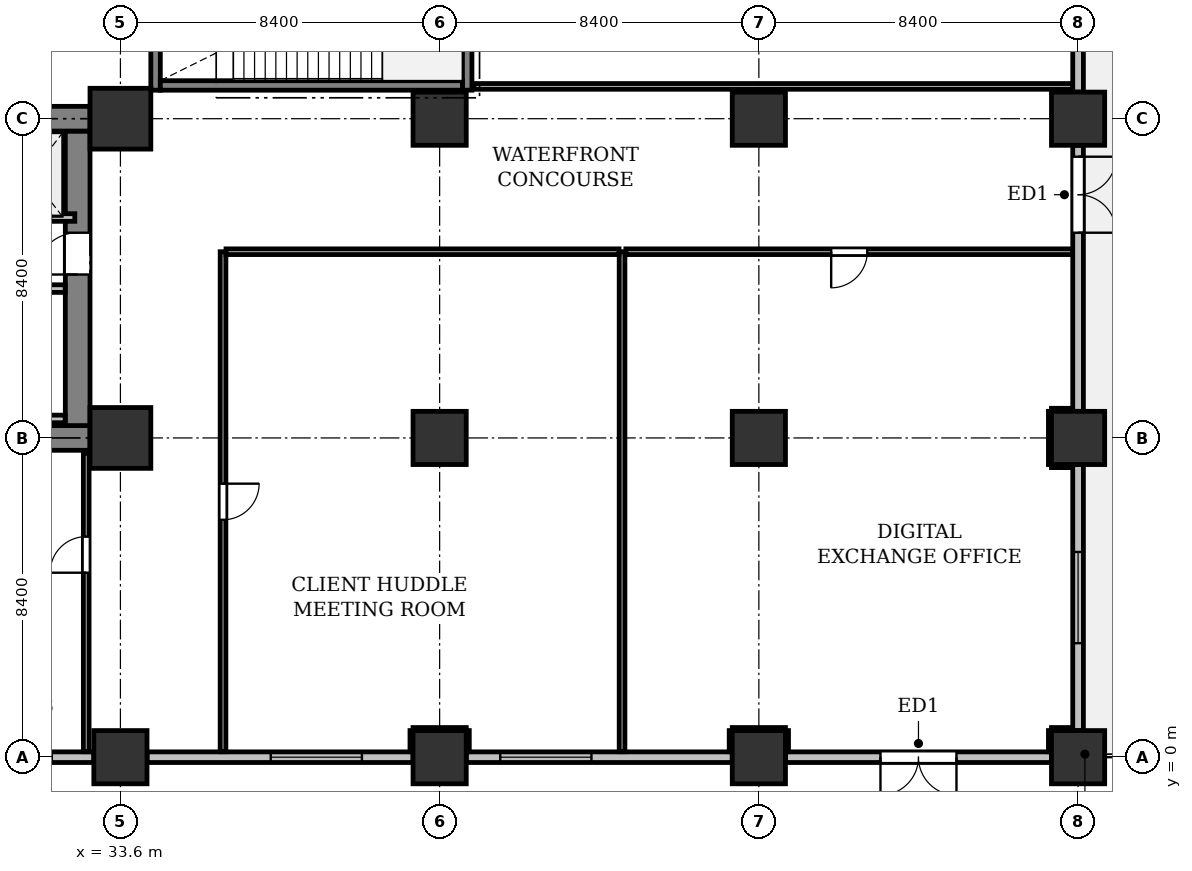
"""IFC4 building model, lengths in metres.
Left out: names, types, materials, properties, quantities, classifications, styles, units other than length and angle.
Written with IfcOpenShell. Run it as: python <this file> out.ifc"""

import sys

from ifc_helpers import new_model, si_unit, direction, frame, frame_2d, origin, origin_2d, place, context, subcontext, project, spatial, rectangle, extrude, element, fill, save


model = new_model("IFC4")
c1 = context("Model", 3, precision=1e-05, world=origin(), true_north=direction((0.0, 1.0)))
c2 = subcontext(c1, "Body", "Model", "MODEL_VIEW")
j1 = project(units=[si_unit("LENGTHUNIT", "METRE"), si_unit("PLANEANGLEUNIT", "RADIAN")], contexts=[c1])
p1 = place(None, origin())
s1 = spatial("IfcSite", under=j1, at=p1, CompositionType="ELEMENT")
p2 = place(p1, origin())
s2 = spatial("IfcBuilding", under=s1, at=p2, CompositionType="ELEMENT")
p3 = place(p2, origin())
s3 = spatial("IfcBuildingStorey", under=s2, at=p3, CompositionType="ELEMENT", Elevation=0.0)
p4 = place(p3, frame((33.6, 0.0, 0.0), z_axis=(0.0, 0.0, 1.0), x_axis=(1.0, 0.0, 0.0)))
e1 = element("IfcColumn", 1, at=p4, inside=s3, PredefinedType="COLUMN", context=c2, shape_type="SweptSolid", body=[
    extrude(rectangle(XDim=1.4, YDim=1.4, at=origin_2d()), origin(), (0.0, 0.0, 1.0), 5.4),
])
for number, where, z_axis, x_axis in (
    (2, (33.6, 8.4, 0.0), (0.0, 0.0, 1.0), (1.0, 0.0, 0.0)),
    (3, (33.6, 16.8, 0.0), (0.0, 0.0, 1.0), (1.0, 0.0, 0.0)),
):
    element("IfcColumn", number, at=place(p3, frame(where, z_axis=z_axis, x_axis=x_axis)), inside=s3, PredefinedType="COLUMN", context=c2, shape_type="SweptSolid", body=[
        extrude(rectangle(XDim=1.6, YDim=1.6, at=origin_2d()), origin(), (0.0, 0.0, 1.0), 5.4),
    ])
for number, where, z_axis, x_axis in (
    (4, (42.0, 0.0, 0.0), (0.0, 0.0, 1.0), (1.0, 0.0, 0.0)),
    (5, (42.0, 8.4, 0.0), (0.0, 0.0, 1.0), (1.0, 0.0, 0.0)),
    (6, (42.0, 16.8, 0.0), (0.0, 0.0, 1.0), (1.0, 0.0, 0.0)),
    (7, (50.4, 0.0, 0.0), (0.0, 0.0, 1.0), (1.0, 0.0, 0.0)),
    (8, (50.4, 8.4, 0.0), (0.0, 0.0, 1.0), (1.0, 0.0, 0.0)),
    (9, (50.4, 16.8, 0.0), (0.0, 0.0, 1.0), (1.0, 0.0, 0.0)),
    (10, (58.8, 0.0, 0.0), (0.0, 0.0, 1.0), (1.0, 0.0, 0.0)),
    (11, (58.8, 8.4, 0.0), (0.0, 0.0, 1.0), (1.0, 0.0, 0.0)),
    (12, (58.8, 16.8, 0.0), (0.0, 0.0, 1.0), (1.0, 0.0, 0.0)),
):
    element("IfcColumn", number, at=place(p3, frame(where, z_axis=z_axis, x_axis=x_axis)), inside=s3, PredefinedType="COLUMN", context=c2, shape_type="SweptSolid", body=[
        extrude(rectangle(XDim=1.4, YDim=1.4, at=origin_2d()), origin(), (0.0, 0.0, 1.0), 5.4),
    ])
p5 = place(p3, frame((58.8, 24.5, 0.0), z_axis=(0.0, 0.0, 1.0), x_axis=(0.0, -1.0, 0.0)))
e13 = element("IfcWall", 13, at=p5, inside=s3, PredefinedType="STANDARD", context=c2, shape_type="SweptSolid", body=[
    extrude(rectangle(XDim=7.0, YDim=0.28, at=frame_2d((3.5, 0.0))), origin(), (0.0, 0.0, 1.0), 4.513),
])
p6 = place(p5, frame((0.38, 0.0, 0.0)))
e14 = element("IfcOpeningElement", 14, at=p6, cuts=e13, PredefinedType="OPENING", context=c2, shape_type="SweptSolid", body=[
    extrude(rectangle(XDim=2.0, YDim=2.4, at=frame_2d((1.0, 1.2))), frame((0.0, 0.15, 0.0), z_axis=(0.0, -1.0, 0.0), x_axis=(1.0, 0.0, 0.0)), (0.0, 0.0, 1.0), 0.3),
])
p7 = place(p3, frame((58.8, 16.1, 0.0), z_axis=(0.0, 0.0, 1.0), x_axis=(0.0, -1.0, 0.0)))
e15 = element("IfcWall", 15, at=p7, inside=s3, PredefinedType="STANDARD", context=c2, shape_type="SweptSolid", body=[
    extrude(rectangle(XDim=7.0, YDim=0.28, at=frame_2d((3.5, 0.0))), origin(), (0.0, 0.0, 1.0), 4.513),
])
p8 = place(p7, frame((0.3, 0.0, 0.0)))
e16 = element("IfcOpeningElement", 16, at=p8, cuts=e15, PredefinedType="OPENING", context=c2, shape_type="SweptSolid", body=[
    extrude(rectangle(XDim=2.0, YDim=2.4, at=frame_2d((1.0, 1.2))), frame((0.0, 0.15, 0.0), z_axis=(0.0, -1.0, 0.0), x_axis=(1.0, 0.0, 0.0)), (0.0, 0.0, 1.0), 0.3),
])
p9 = place(p3, frame((58.8, 7.7, 0.0), z_axis=(0.0, 0.0, 1.0), x_axis=(0.0, -1.0, 0.0)))
e17 = element("IfcWall", 17, at=p9, inside=s3, PredefinedType="STANDARD", context=c2, shape_type="SweptSolid", body=[
    extrude(rectangle(XDim=7.0, YDim=0.28, at=frame_2d((3.5, 0.0))), origin(), (0.0, 0.0, 1.0), 4.513),
])
p10 = place(p9, frame((2.3, 0.0, 0.9)))
e18 = element("IfcOpeningElement", 18, at=p10, cuts=e17, PredefinedType="OPENING", context=c2, shape_type="SweptSolid", body=[
    extrude(rectangle(XDim=2.4, YDim=1.8, at=frame_2d((1.2, 0.9))), frame((0.0, 0.15, 0.0), z_axis=(0.0, -1.0, 0.0), x_axis=(1.0, 0.0, 0.0)), (0.0, 0.0, 1.0), 0.3),
])
p11 = place(p3, frame((58.1, 0.0, 0.0), z_axis=(0.0, 0.0, 1.0), x_axis=(-1.0, 0.0, 0.0)))
e19 = element("IfcWall", 19, at=p11, inside=s3, PredefinedType="STANDARD", context=c2, shape_type="SweptSolid", body=[
    extrude(rectangle(XDim=7.0, YDim=0.28, at=frame_2d((3.5, 0.0))), origin(), (0.0, 0.0, 1.0), 4.325),
])
p12 = place(p11, frame((2.5, 0.0, 0.0)))
e20 = element("IfcOpeningElement", 20, at=p12, cuts=e19, PredefinedType="OPENING", context=c2, shape_type="SweptSolid", body=[
    extrude(rectangle(XDim=2.0, YDim=2.4, at=frame_2d((1.0, 1.2))), frame((0.0, 0.15, 0.0), z_axis=(0.0, -1.0, 0.0), x_axis=(1.0, 0.0, 0.0)), (0.0, 0.0, 1.0), 0.3),
])
p13 = place(p3, frame((49.7, 0.0, 0.0), z_axis=(0.0, 0.0, 1.0), x_axis=(-1.0, 0.0, 0.0)))
e21 = element("IfcWall", 21, at=p13, inside=s3, PredefinedType="STANDARD", context=c2, shape_type="SweptSolid", body=[
    extrude(rectangle(XDim=7.0, YDim=0.28, at=frame_2d((3.5, 0.0))), origin(), (0.0, 0.0, 1.0), 4.325),
])
p14 = place(p13, frame((3.705, 0.0, 0.9)))
e22 = element("IfcOpeningElement", 22, at=p14, cuts=e21, PredefinedType="OPENING", context=c2, shape_type="SweptSolid", body=[
    extrude(rectangle(XDim=2.4, YDim=1.8, at=frame_2d((1.2, 0.9))), frame((0.0, 0.15, 0.0), z_axis=(0.0, -1.0, 0.0), x_axis=(1.0, 0.0, 0.0)), (0.0, 0.0, 1.0), 0.3),
])
p15 = place(p3, frame((41.3, 0.0, 0.0), z_axis=(0.0, 0.0, 1.0), x_axis=(-1.0, 0.0, 0.0)))
e23 = element("IfcWall", 23, at=p15, inside=s3, PredefinedType="STANDARD", context=c2, shape_type="SweptSolid", body=[
    extrude(rectangle(XDim=7.0, YDim=0.28, at=frame_2d((3.5, 0.0))), origin(), (0.0, 0.0, 1.0), 4.325),
])
p16 = place(p15, frame((1.345, 0.0, 0.9)))
e24 = element("IfcOpeningElement", 24, at=p16, cuts=e23, PredefinedType="OPENING", context=c2, shape_type="SweptSolid", body=[
    extrude(rectangle(XDim=2.4, YDim=1.8, at=frame_2d((1.2, 0.9))), frame((0.0, 0.15, 0.0), z_axis=(0.0, -1.0, 0.0), x_axis=(1.0, 0.0, 0.0)), (0.0, 0.0, 1.0), 0.3),
])
p17 = place(p3, frame((32.9, 0.0, 0.0), z_axis=(0.0, 0.0, 1.0), x_axis=(-1.0, 0.0, 0.0)))
e25 = element("IfcWall", 25, at=p17, inside=s3, PredefinedType="STANDARD", context=c2, shape_type="SweptSolid", body=[
    extrude(rectangle(XDim=3.3, YDim=0.28, at=frame_2d((1.65, 0.0))), origin(), (0.0, 0.0, 1.0), 4.325),
])
p18 = place(p17, frame((1.105, 0.0, 0.9)))
e26 = element("IfcOpeningElement", 26, at=p18, cuts=e25, PredefinedType="OPENING", context=c2, shape_type="SweptSolid", body=[
    extrude(rectangle(XDim=1.2, YDim=1.5, at=frame_2d((0.6, 0.75))), frame((0.0, 0.15, 0.0), z_axis=(0.0, -1.0, 0.0), x_axis=(1.0, 0.0, 0.0)), (0.0, 0.0, 1.0), 0.3),
])
p19 = place(p3, frame((26.0, 8.4, 0.0), z_axis=(0.0, 0.0, 1.0), x_axis=(1.0, 0.0, 0.0)))
e27 = element("IfcWall", 27, at=p19, inside=s3, PredefinedType="SHEAR", context=c2, shape_type="SweptSolid", body=[
    extrude(rectangle(XDim=6.8, YDim=0.65, at=frame_2d((3.4, 0.0))), origin(), (0.0, 0.0, 1.0), 5.125),
])
p20 = place(p3, frame((32.475, 8.725, 0.0), z_axis=(0.0, 0.0, 1.0), x_axis=(0.0, 1.0, 0.0)))
e28 = element("IfcWall", 28, at=p20, inside=s3, PredefinedType="SHEAR", context=c2, shape_type="SweptSolid", body=[
    extrude(rectangle(XDim=7.75, YDim=0.65, at=frame_2d((3.875, 0.0))), origin(), (0.0, 0.0, 1.0), 5.125),
])
p21 = place(p20, frame((3.975, 0.0, 0.0)))
e29 = element("IfcOpeningElement", 29, at=p21, cuts=e28, PredefinedType="OPENING", context=c2, shape_type="SweptSolid", body=[
    extrude(rectangle(XDim=1.1, YDim=2.15, at=frame_2d((0.55, 1.075))), frame((0.0, 0.335, 0.0), z_axis=(0.0, -1.0, 0.0), x_axis=(1.0, 0.0, 0.0)), (0.0, 0.0, 1.0), 0.67),
])
p22 = place(p3, frame((26.0, 16.8, 0.0), z_axis=(0.0, 0.0, 1.0), x_axis=(1.0, 0.0, 0.0)))
e30 = element("IfcWall", 30, at=p22, inside=s3, PredefinedType="SHEAR", context=c2, shape_type="SweptSolid", body=[
    extrude(rectangle(XDim=6.8, YDim=0.65, at=frame_2d((3.4, 0.0))), origin(), (0.0, 0.0, 1.0), 5.125),
])
for number, where, z_axis, x_axis in (
    (31, (34.525, 17.55, 0.0), (0.0, 0.0, 1.0), (0.0, 1.0, 0.0)),
    (32, (42.725, 17.55, 0.0), (0.0, 0.0, 1.0), (0.0, 1.0, 0.0)),
):
    element("IfcWall", number, at=place(p3, frame(where, z_axis=z_axis, x_axis=x_axis)), inside=s3, PredefinedType="SHEAR", context=c2, shape_type="SweptSolid", body=[
        extrude(rectangle(XDim=4.45, YDim=0.25, at=frame_2d((2.225, 0.0))), origin(), (0.0, 0.0, 1.0), 5.125),
    ])
p23 = place(p3, frame((34.65, 17.675, 0.0), z_axis=(0.0, 0.0, 1.0), x_axis=(1.0, 0.0, 0.0)))
e33 = element("IfcWall", 33, at=p23, inside=s3, PredefinedType="SHEAR", context=c2, shape_type="SweptSolid", body=[
    extrude(rectangle(XDim=7.95, YDim=0.25, at=frame_2d((3.975, 0.0))), origin(), (0.0, 0.0, 1.0), 5.125),
])
p24 = place(p3, frame((30.05, 14.2, 0.0), z_axis=(0.0, 0.0, 1.0), x_axis=(1.0, 0.0, 0.0)))
e34 = element("IfcWall", 34, at=p24, inside=s3, PredefinedType="PARTITIONING", context=c2, shape_type="SweptSolid", body=[
    extrude(rectangle(XDim=2.35, YDim=0.2, at=frame_2d((1.175, 0.0))), origin(), (0.0, 0.0, 1.0), 5.125),
])
p25 = place(p24, frame((0.625, 0.0, 0.0)))
e35 = element("IfcOpeningElement", 35, at=p25, cuts=e34, PredefinedType="OPENING", context=c2, shape_type="SweptSolid", body=[
    extrude(rectangle(XDim=1.1, YDim=2.2, at=frame_2d((0.55, 1.1))), frame((0.0, 0.11, 0.0), z_axis=(0.0, -1.0, 0.0), x_axis=(1.0, 0.0, 0.0)), (0.0, 0.0, 1.0), 0.22),
])
p26 = place(p3, frame((32.146, 12.33, 0.0), z_axis=(0.0, 0.0, 1.0), x_axis=(-1.0, 0.0, 0.0)))
e36 = element("IfcWall", 36, at=p26, inside=s3, PredefinedType="PARTITIONING", context=c2, shape_type="SweptSolid", body=[
    extrude(rectangle(XDim=2.296, YDim=0.2, at=frame_2d((1.148, 0.0))), origin(), (0.0, 0.0, 1.0), 5.125),
])
p27 = place(p26, frame((0.723, 0.0, 0.0)))
e37 = element("IfcOpeningElement", 37, at=p27, cuts=e36, PredefinedType="OPENING", context=c2, shape_type="SweptSolid", body=[
    extrude(rectangle(XDim=0.85, YDim=2.15, at=frame_2d((0.425, 1.075))), frame((0.0, 0.11, 0.0), z_axis=(0.0, -1.0, 0.0), x_axis=(1.0, 0.0, 0.0)), (0.0, 0.0, 1.0), 0.22),
])
p28 = place(p3, frame((29.85, 8.9, 0.0), z_axis=(0.0, 0.0, 1.0), x_axis=(1.0, 0.0, 0.0)))
e38 = element("IfcWall", 38, at=p28, inside=s3, PredefinedType="PARTITIONING", context=c2, shape_type="SweptSolid", body=[
    extrude(rectangle(XDim=2.296, YDim=0.2, at=frame_2d((1.148, 0.0))), origin(), (0.0, 0.0, 1.0), 5.125),
])
p29 = place(p3, frame((42.9, 17.65, 0.0), z_axis=(0.0, 0.0, 1.0), x_axis=(1.0, 0.0, 0.0)))
e39 = element("IfcWall", 39, at=p29, inside=s3, PredefinedType="PARTITIONING", context=c2, shape_type="SweptSolid", body=[
    extrude(rectangle(XDim=15.756, YDim=0.15, at=frame_2d((7.878, 0.0))), origin(), (0.0, 0.0, 1.0), 4.513),
])
p30 = place(p3, frame((36.3, 13.3, 0.0), z_axis=(0.0, 0.0, 1.0), x_axis=(0.0, -1.0, 0.0)))
e40 = element("IfcWall", 40, at=p30, inside=s3, PredefinedType="PARTITIONING", context=c2, shape_type="SweptSolid", body=[
    extrude(rectangle(XDim=13.156, YDim=0.15, at=frame_2d((6.578, 0.0))), origin(), (0.0, 0.0, 1.0), 4.325),
])
p31 = place(p30, frame((6.103, 0.0, 0.0)))
e41 = element("IfcOpeningElement", 41, at=p31, cuts=e40, PredefinedType="OPENING", context=c2, shape_type="SweptSolid", body=[
    extrude(rectangle(XDim=0.95, YDim=2.15, at=frame_2d((0.475, 1.075))), frame((0.0, 0.085, 0.0), z_axis=(0.0, -1.0, 0.0), x_axis=(1.0, 0.0, 0.0)), (0.0, 0.0, 1.0), 0.17),
])
p32 = place(p3, frame((41.28, 0.144, 0.0), z_axis=(0.0, 0.0, 1.0), x_axis=(0.0, 1.0, 0.0)))
e42 = element("IfcWall", 42, at=p32, inside=s3, PredefinedType="PARTITIONING", context=c2, shape_type="SweptSolid", body=[
    extrude(rectangle(XDim=0.556, YDim=0.12, at=frame_2d((0.278, 0.0))), origin(), (0.0, 0.0, 1.0), 5.125),
])
p33 = place(p3, frame((41.3, 0.72, 0.0), z_axis=(0.0, 0.0, 1.0), x_axis=(1.0, 0.0, 0.0)))
e43 = element("IfcWall", 43, at=p33, inside=s3, PredefinedType="PARTITIONING", context=c2, shape_type="SweptSolid", body=[
    extrude(rectangle(XDim=1.4, YDim=0.12, at=frame_2d((0.7, 0.0))), origin(), (0.0, 0.0, 1.0), 4.513),
])
p34 = place(p3, frame((42.72, 0.7, 0.0), z_axis=(0.0, 0.0, 1.0), x_axis=(0.0, -1.0, 0.0)))
e44 = element("IfcWall", 44, at=p34, inside=s3, PredefinedType="PARTITIONING", context=c2, shape_type="SweptSolid", body=[
    extrude(rectangle(XDim=0.556, YDim=0.12, at=frame_2d((0.278, 0.0))), origin(), (0.0, 0.0, 1.0), 5.125),
])
p35 = place(p3, frame((46.8, 0.144, 0.0), z_axis=(0.0, 0.0, 1.0), x_axis=(0.0, 1.0, 0.0)))
e45 = element("IfcWall", 45, at=p35, inside=s3, PredefinedType="PARTITIONING", context=c2, shape_type="SweptSolid", body=[
    extrude(rectangle(XDim=13.156, YDim=0.15, at=frame_2d((6.578, 0.0))), origin(), (0.0, 0.0, 1.0), 4.325),
])
p36 = place(p3, frame((46.721, 13.3, 0.0), z_axis=(0.0, 0.0, 1.0), x_axis=(-1.0, 0.0, 0.0)))
e46 = element("IfcWall", 46, at=p36, inside=s3, PredefinedType="PARTITIONING", context=c2, shape_type="SweptSolid", body=[
    extrude(rectangle(XDim=10.342, YDim=0.15, at=frame_2d((5.171, 0.0))), origin(), (0.0, 0.0, 1.0), 4.513),
])
p37 = place(p3, frame((49.68, 0.144, 0.0), z_axis=(0.0, 0.0, 1.0), x_axis=(0.0, 1.0, 0.0)))
e47 = element("IfcWall", 47, at=p37, inside=s3, PredefinedType="PARTITIONING", context=c2, shape_type="SweptSolid", body=[
    extrude(rectangle(XDim=0.556, YDim=0.12, at=frame_2d((0.278, 0.0))), origin(), (0.0, 0.0, 1.0), 5.125),
])
p38 = place(p3, frame((49.7, 0.72, 0.0), z_axis=(0.0, 0.0, 1.0), x_axis=(1.0, 0.0, 0.0)))
e48 = element("IfcWall", 48, at=p38, inside=s3, PredefinedType="PARTITIONING", context=c2, shape_type="SweptSolid", body=[
    extrude(rectangle(XDim=1.4, YDim=0.12, at=frame_2d((0.7, 0.0))), origin(), (0.0, 0.0, 1.0), 4.513),
])
for number, where, z_axis, x_axis in (
    (49, (51.12, 0.7, 0.0), (0.0, 0.0, 1.0), (0.0, -1.0, 0.0)),
    (50, (58.08, 0.144, 0.0), (0.0, 0.0, 1.0), (0.0, 1.0, 0.0)),
    (51, (58.1, 0.72, 0.0), (0.0, 0.0, 1.0), (1.0, 0.0, 0.0)),
    (52, (58.656, 7.68, 0.0), (0.0, 0.0, 1.0), (-1.0, 0.0, 0.0)),
):
    element("IfcWall", number, at=place(p3, frame(where, z_axis=z_axis, x_axis=x_axis)), inside=s3, PredefinedType="PARTITIONING", context=c2, shape_type="SweptSolid", body=[
        extrude(rectangle(XDim=0.556, YDim=0.12, at=frame_2d((0.278, 0.0))), origin(), (0.0, 0.0, 1.0), 5.125),
    ])
p39 = place(p3, frame((58.08, 7.7, 0.0), z_axis=(0.0, 0.0, 1.0), x_axis=(0.0, 1.0, 0.0)))
e53 = element("IfcWall", 53, at=p39, inside=s3, PredefinedType="PARTITIONING", context=c2, shape_type="SweptSolid", body=[
    extrude(rectangle(XDim=1.4, YDim=0.12, at=frame_2d((0.7, 0.0))), origin(), (0.0, 0.0, 1.0), 4.325),
])
p40 = place(p3, frame((58.1, 9.12, 0.0), z_axis=(0.0, 0.0, 1.0), x_axis=(1.0, 0.0, 0.0)))
e54 = element("IfcWall", 54, at=p40, inside=s3, PredefinedType="PARTITIONING", context=c2, shape_type="SweptSolid", body=[
    extrude(rectangle(XDim=0.556, YDim=0.12, at=frame_2d((0.278, 0.0))), origin(), (0.0, 0.0, 1.0), 5.125),
])
p41 = place(p3, frame((58.656, 13.3, 0.0), z_axis=(0.0, 0.0, 1.0), x_axis=(-1.0, 0.0, 0.0)))
e55 = element("IfcWall", 55, at=p41, inside=s3, PredefinedType="PARTITIONING", context=c2, shape_type="SweptSolid", body=[
    extrude(rectangle(XDim=11.756, YDim=0.15, at=frame_2d((5.878, 0.0))), origin(), (0.0, 0.0, 1.0), 4.513),
])
p42 = place(p41, frame((5.403, 0.0, 0.0)))
e56 = element("IfcOpeningElement", 56, at=p42, cuts=e55, PredefinedType="OPENING", context=c2, shape_type="SweptSolid", body=[
    extrude(rectangle(XDim=0.95, YDim=2.15, at=frame_2d((0.475, 1.075))), frame((0.0, 0.085, 0.0), z_axis=(0.0, -1.0, 0.0), x_axis=(1.0, 0.0, 0.0)), (0.0, 0.0, 1.0), 0.17),
])
p43 = place(p3, frame((32.7, 0.144, 0.0), z_axis=(0.0, 0.0, 1.0), x_axis=(0.0, 1.0, 0.0)))
e57 = element("IfcWall", 57, at=p43, inside=s3, PredefinedType="PARTITIONING", context=c2, shape_type="SweptSolid", body=[
    extrude(rectangle(XDim=7.856, YDim=0.15, at=frame_2d((3.928, 0.0))), origin(), (0.0, 0.0, 1.0), 5.125),
])
p44 = place(p43, frame((4.71, 0.0, 0.0)))
e58 = element("IfcOpeningElement", 58, at=p44, cuts=e57, PredefinedType="OPENING", context=c2, shape_type="SweptSolid", body=[
    extrude(rectangle(XDim=0.95, YDim=2.15, at=frame_2d((0.475, 1.075))), frame((0.0, 0.085, 0.0), z_axis=(0.0, -1.0, 0.0), x_axis=(1.0, 0.0, 0.0)), (0.0, 0.0, 1.0), 0.17),
])
p45 = place(p8, origin())
e59 = element("IfcDoor", 59, at=p45, inside=s3, OperationType="DOUBLE_DOOR_SINGLE_SWING", PredefinedType="DOOR", context=c2, shape_type="SweptSolid", body=[
    extrude(rectangle(XDim=2.0, YDim=2.4, at=frame_2d((1.0, 1.2))), frame((0.0, 0.025, 0.0), z_axis=(0.0, -1.0, 0.0), x_axis=(1.0, 0.0, 0.0)), (0.0, 0.0, 1.0), 0.05),
])
fill(e16, e59)
p46 = place(p10, origin())
e60 = element("IfcWindow", 60, at=p46, inside=s3, PartitioningType="SINGLE_PANEL", PredefinedType="WINDOW", context=c2, shape_type="SweptSolid", body=[
    extrude(rectangle(XDim=2.4, YDim=1.8, at=frame_2d((1.2, 0.9))), frame((0.0, 0.03, 0.0), z_axis=(0.0, -1.0, 0.0), x_axis=(1.0, 0.0, 0.0)), (0.0, 0.0, 1.0), 0.06),
])
fill(e18, e60)
p47 = place(p12, origin())
e61 = element("IfcDoor", 61, at=p47, inside=s3, OperationType="DOUBLE_DOOR_SINGLE_SWING", PredefinedType="DOOR", context=c2, shape_type="SweptSolid", body=[
    extrude(rectangle(XDim=2.0, YDim=2.4, at=frame_2d((1.0, 1.2))), frame((0.0, 0.025, 0.0), z_axis=(0.0, -1.0, 0.0), x_axis=(1.0, 0.0, 0.0)), (0.0, 0.0, 1.0), 0.05),
])
fill(e20, e61)
p48 = place(p14, origin())
e62 = element("IfcWindow", 62, at=p48, inside=s3, PartitioningType="SINGLE_PANEL", PredefinedType="WINDOW", context=c2, shape_type="SweptSolid", body=[
    extrude(rectangle(XDim=2.4, YDim=1.8, at=frame_2d((1.2, 0.9))), frame((0.0, 0.03, 0.0), z_axis=(0.0, -1.0, 0.0), x_axis=(1.0, 0.0, 0.0)), (0.0, 0.0, 1.0), 0.06),
])
fill(e22, e62)
p49 = place(p16, origin())
e63 = element("IfcWindow", 63, at=p49, inside=s3, PartitioningType="SINGLE_PANEL", PredefinedType="WINDOW", context=c2, shape_type="SweptSolid", body=[
    extrude(rectangle(XDim=2.4, YDim=1.8, at=frame_2d((1.2, 0.9))), frame((0.0, 0.03, 0.0), z_axis=(0.0, -1.0, 0.0), x_axis=(1.0, 0.0, 0.0)), (0.0, 0.0, 1.0), 0.06),
])
fill(e24, e63)
p50 = place(p21, origin())
e64 = element("IfcDoor", 64, at=p50, inside=s3, OperationType="SINGLE_SWING_LEFT", PredefinedType="DOOR", context=c2, shape_type="SweptSolid", body=[
    extrude(rectangle(XDim=1.1, YDim=2.15, at=frame_2d((0.55, 1.075))), frame((0.0, 0.025, 0.0), z_axis=(0.0, -1.0, 0.0), x_axis=(1.0, 0.0, 0.0)), (0.0, 0.0, 1.0), 0.05),
])
fill(e29, e64)
p51 = place(p31, origin())
e65 = element("IfcDoor", 65, at=p51, inside=s3, OperationType="SINGLE_SWING_LEFT", PredefinedType="DOOR", context=c2, shape_type="SweptSolid", body=[
    extrude(rectangle(XDim=0.95, YDim=2.15, at=frame_2d((0.475, 1.075))), frame((0.0, 0.025, 0.0), z_axis=(0.0, -1.0, 0.0), x_axis=(1.0, 0.0, 0.0)), (0.0, 0.0, 1.0), 0.05),
])
fill(e41, e65)
p52 = place(p42, origin())
e66 = element("IfcDoor", 66, at=p52, inside=s3, OperationType="SINGLE_SWING_RIGHT", PredefinedType="DOOR", context=c2, shape_type="SweptSolid", body=[
    extrude(rectangle(XDim=0.95, YDim=2.15, at=frame_2d((0.475, 1.075))), frame((0.0, 0.025, 0.0), z_axis=(0.0, -1.0, 0.0), x_axis=(1.0, 0.0, 0.0)), (0.0, 0.0, 1.0), 0.05),
])
fill(e56, e66)
p53 = place(p44, origin())
e67 = element("IfcDoor", 67, at=p53, inside=s3, OperationType="SINGLE_SWING_LEFT", PredefinedType="DOOR", context=c2, shape_type="SweptSolid", body=[
    extrude(rectangle(XDim=0.95, YDim=2.15, at=frame_2d((0.475, 1.075))), frame((0.0, 0.025, 0.0), z_axis=(0.0, -1.0, 0.0), x_axis=(1.0, 0.0, 0.0)), (0.0, 0.0, 1.0), 0.05),
])
fill(e58, e67)
save(model, sys.argv[1])
